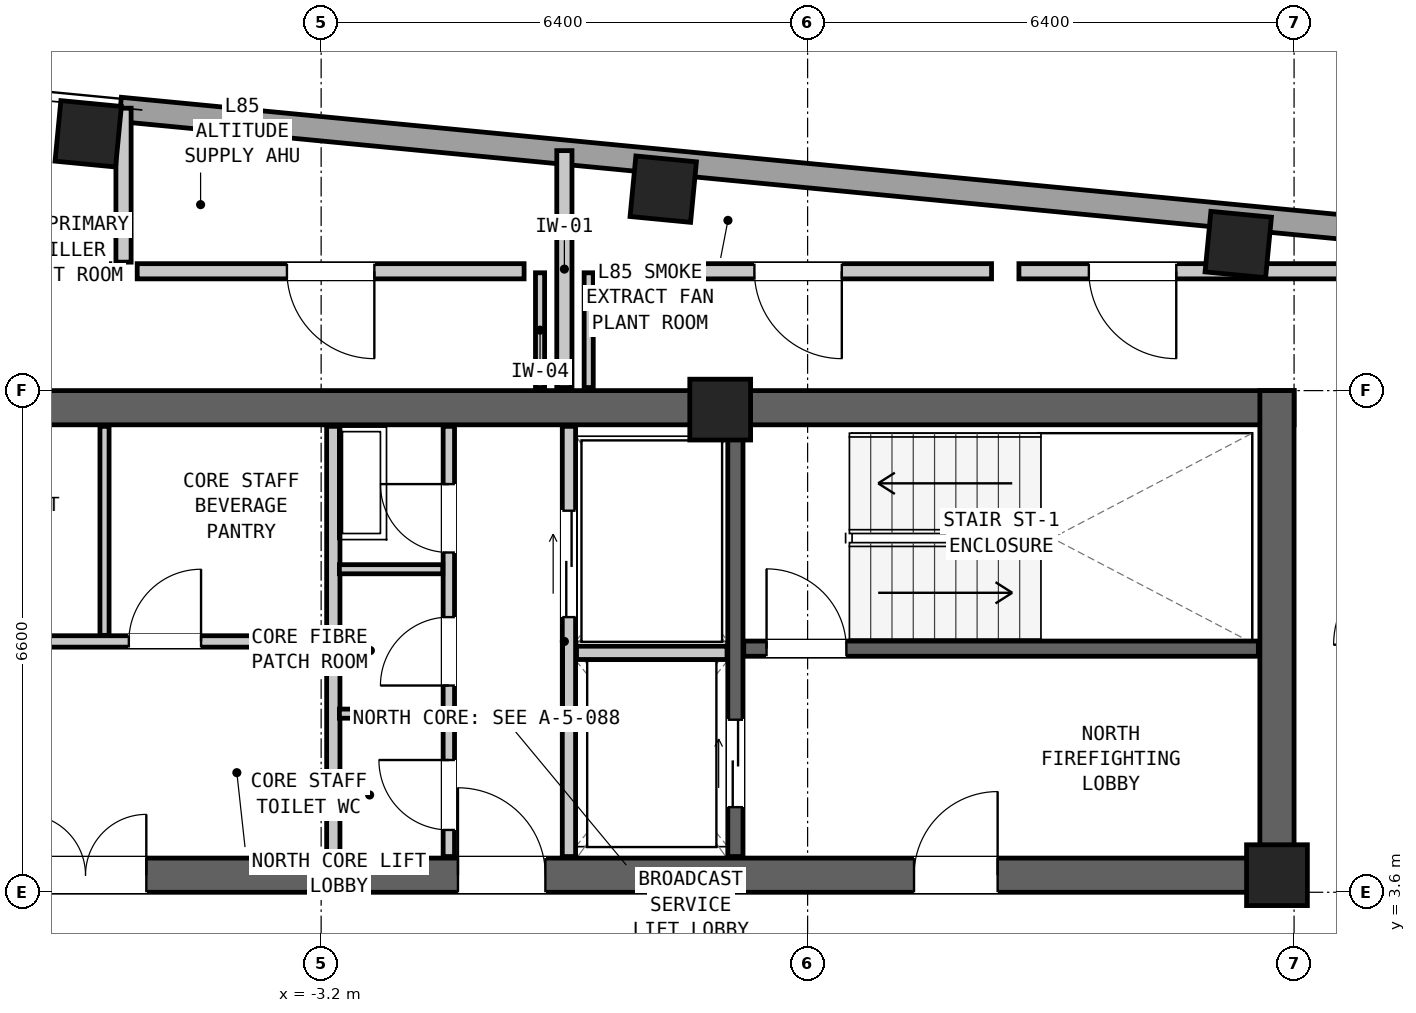
"""IFC4 building model, lengths in metres.
Left out: names, types, materials, properties, quantities, classifications, styles, units other than length and angle.
Written with IfcOpenShell. Run it as: python <this file> out.ifc"""

import sys

from ifc_helpers import new_model, si_unit, direction, frame, frame_2d, origin, origin_2d, place, context, subcontext, project, spatial, rectangle, extrude, element, fill, save


model = new_model("IFC4")
c1 = context("Model", 3, precision=1e-05, world=origin(), true_north=direction((0.0, 1.0)))
c2 = subcontext(c1, "Body", "Model", "MODEL_VIEW")
j1 = project(units=[si_unit("LENGTHUNIT", "METRE"), si_unit("PLANEANGLEUNIT", "RADIAN")], contexts=[c1])
p1 = place(None, origin())
s1 = spatial("IfcSite", under=j1, at=p1, CompositionType="ELEMENT")
p2 = place(p1, origin())
s2 = spatial("IfcBuilding", under=s1, at=p2, CompositionType="ELEMENT")
p3 = place(p2, frame((0.0, 0.0, 289.25)))
s3 = spatial("IfcBuildingStorey", under=s2, at=p3, CompositionType="ELEMENT", Elevation=289.25)
p4 = place(p3, frame((-9.6, 9.975, 0.0), z_axis=(0.0, 0.0, 1.0), x_axis=(1.0, 0.0, 0.0)))
e1 = element("IfcWall", 1, at=p4, inside=s3, PredefinedType="SHEAR", context=c2, shape_type="SweptSolid", body=[
    extrude(rectangle(XDim=19.2, YDim=0.45, at=frame_2d((9.6, 0.0))), origin(), (0.0, 0.0, 1.0), 3.6),
])
p5 = place(p3, frame((-9.6, 3.825, 0.0), z_axis=(0.0, 0.0, 1.0), x_axis=(1.0, 0.0, 0.0)))
e2 = element("IfcWall", 2, at=p5, inside=s3, PredefinedType="SHEAR", context=c2, shape_type="SweptSolid", body=[
    extrude(rectangle(XDim=19.2, YDim=0.45, at=frame_2d((9.6, 0.0))), origin(), (0.0, 0.0, 1.0), 3.6),
])
p6 = place(p5, frame((14.2, 0.0, 0.0)))
e3 = element("IfcOpeningElement", 3, at=p6, cuts=e2, PredefinedType="OPENING", context=c2, shape_type="SweptSolid", body=[
    extrude(rectangle(XDim=1.1, YDim=2.08, at=frame_2d((0.55, 1.04))), frame((0.0, 0.237, 0.0), z_axis=(0.0, -1.0, 0.0), x_axis=(1.0, 0.0, 0.0)), (0.0, 0.0, 1.0), 0.474),
])
p7 = place(p5, frame((8.2, 0.0, 0.0)))
e4 = element("IfcOpeningElement", 4, at=p7, cuts=e2, PredefinedType="OPENING", context=c2, shape_type="SweptSolid", body=[
    extrude(rectangle(XDim=1.15, YDim=2.1, at=frame_2d((0.575, 1.05))), frame((0.0, 0.237, 0.0), z_axis=(0.0, -1.0, 0.0), x_axis=(1.0, 0.0, 0.0)), (0.0, 0.0, 1.0), 0.474),
])
p8 = place(p5, frame((2.5, 0.0, 0.0)))
e5 = element("IfcOpeningElement", 5, at=p8, cuts=e2, PredefinedType="OPENING", context=c2, shape_type="SweptSolid", body=[
    extrude(rectangle(XDim=1.6, YDim=2.12, at=frame_2d((0.8, 1.06))), frame((0.0, 0.237, 0.0), z_axis=(0.0, -1.0, 0.0), x_axis=(1.0, 0.0, 0.0)), (0.0, 0.0, 1.0), 0.474),
])
p9 = place(p3, frame((9.375, 3.6, 0.0), z_axis=(0.0, 0.0, 1.0), x_axis=(0.0, 1.0, 0.0)))
e6 = element("IfcWall", 6, at=p9, inside=s3, PredefinedType="SHEAR", context=c2, shape_type="SweptSolid", body=[
    extrude(rectangle(XDim=6.6, YDim=0.45, at=frame_2d((3.3, 0.0))), origin(), (0.0, 0.0, 1.0), 3.6),
])
for number, where, z_axis, x_axis in (
    (7, (8.865, 12.122, 0.0), (0.0, 0.0, 1.0), (0.995, -0.096, 0.0)),
    (8, (1.301, 12.85, 0.0), (0.0, 0.0, 1.0), (0.995, -0.096, 0.0)),
    (9, (-6.264, 13.579, 0.0), (0.0, 0.0, 1.0), (0.995, -0.096, 0.0)),
    (10, (2.05, 9.95, 0.0), (0.0, 0.0, 1.0), (1.0, 0.0, 0.0)),
    (11, (9.375, 3.825, 0.0), (0.0, 0.0, 1.0), (1.0, 0.0, 0.0)),
):
    element("IfcColumn", number, at=place(p3, frame(where, z_axis=z_axis, x_axis=x_axis)), inside=s3, PredefinedType="COLUMN", context=c2, shape_type="SweptSolid", body=[
        extrude(rectangle(XDim=0.8, YDim=0.8, at=origin_2d()), origin(), (0.0, 0.0, 1.0), 3.6),
    ])
p10 = place(p3, frame((-5.844, 13.9, 0.0), z_axis=(0.0, 0.0, 1.0), x_axis=(0.995396489284, -0.095842731181, 0.0)))
e12 = element("IfcWall", 12, at=p10, inside=s3, PredefinedType="SOLIDWALL", context=c2, shape_type="SweptSolid", body=[
    extrude(rectangle(XDim=22.024, YDim=0.32, at=frame_2d((11.012, 0.0))), origin(), (0.0, 0.0, 1.0), 2.182),
])
p11 = place(p3, frame((2.36, 6.805, 0.0), z_axis=(0.0, 0.0, 1.0), x_axis=(1.0, 0.0, 0.0)))
e13 = element("IfcWall", 13, at=p11, inside=s3, PredefinedType="SHEAR", context=c2, shape_type="SweptSolid", body=[
    extrude(rectangle(XDim=6.77, YDim=0.2, at=frame_2d((3.385, 0.0))), origin(), (0.0, 0.0, 1.0), 3.32),
])
p12 = place(p11, frame((0.3, 0.0, 0.0)))
e14 = element("IfcOpeningElement", 14, at=p12, cuts=e13, PredefinedType="OPENING", context=c2, shape_type="SweptSolid", body=[
    extrude(rectangle(XDim=1.05, YDim=2.08, at=frame_2d((0.525, 1.04))), frame((0.0, 0.112, 0.0), z_axis=(0.0, -1.0, 0.0), x_axis=(1.0, 0.0, 0.0)), (0.0, 0.0, 1.0), 0.224),
])
p13 = place(p3, frame((2.25, 4.07, 0.0), z_axis=(0.0, 0.0, 1.0), x_axis=(0.0, 1.0, 0.0)))
e15 = element("IfcWall", 15, at=p13, inside=s3, PredefinedType="SHEAR", context=c2, shape_type="SweptSolid", body=[
    extrude(rectangle(XDim=5.66, YDim=0.2, at=frame_2d((2.83, 0.0))), origin(), (0.0, 0.0, 1.0), 3.32),
])
p14 = place(p13, frame((0.65, 0.0, 0.0)))
e16 = element("IfcOpeningElement", 16, at=p14, cuts=e15, PredefinedType="OPENING", context=c2, shape_type="SweptSolid", body=[
    extrude(rectangle(XDim=1.15, YDim=2.08, at=frame_2d((0.575, 1.04))), frame((0.0, 0.112, 0.0), z_axis=(0.0, -1.0, 0.0), x_axis=(1.0, 0.0, 0.0)), (0.0, 0.0, 1.0), 0.224),
])
p15 = place(p3, frame((0.06, 4.07, 0.0), z_axis=(0.0, 0.0, 1.0), x_axis=(0.0, 1.0, 0.0)))
e17 = element("IfcWall", 17, at=p15, inside=s3, PredefinedType="PARTITIONING", context=c2, shape_type="SweptSolid", body=[
    extrude(rectangle(XDim=5.66, YDim=0.175, at=frame_2d((2.83, 0.0))), origin(), (0.0, 0.0, 1.0), 3.32),
])
p16 = place(p15, frame((3.15, 0.0, 0.0)))
e18 = element("IfcOpeningElement", 18, at=p16, cuts=e17, PredefinedType="OPENING", context=c2, shape_type="SweptSolid", body=[
    extrude(rectangle(XDim=1.4, YDim=2.12, at=frame_2d((0.7, 1.06))), frame((0.0, 0.1, 0.0), z_axis=(0.0, -1.0, 0.0), x_axis=(1.0, 0.0, 0.0)), (0.0, 0.0, 1.0), 0.199),
])
p17 = place(p3, frame((0.16, 6.75, 0.0), z_axis=(0.0, 0.0, 1.0), x_axis=(1.0, 0.0, 0.0)))
e19 = element("IfcWall", 19, at=p17, inside=s3, PredefinedType="PARTITIONING", context=c2, shape_type="SweptSolid", body=[
    extrude(rectangle(XDim=1.98, YDim=0.175, at=frame_2d((0.99, 0.0))), origin(), (0.0, 0.0, 1.0), 3.32),
])
p18 = place(p3, frame((-3.04, 4.07, 0.0), z_axis=(0.0, 0.0, 1.0), x_axis=(0.0, 1.0, 0.0)))
e20 = element("IfcWall", 20, at=p18, inside=s3, PredefinedType="PARTITIONING", context=c2, shape_type="SweptSolid", body=[
    extrude(rectangle(XDim=5.66, YDim=0.175, at=frame_2d((2.83, 0.0))), origin(), (0.0, 0.0, 1.0), 3.32),
])
p19 = place(p3, frame((-1.52, 4.07, 0.0), z_axis=(0.0, 0.0, 1.0), x_axis=(0.0, 1.0, 0.0)))
e21 = element("IfcWall", 21, at=p19, inside=s3, PredefinedType="PARTITIONING", context=c2, shape_type="SweptSolid", body=[
    extrude(rectangle(XDim=5.66, YDim=0.15, at=frame_2d((2.83, 0.0))), origin(), (0.0, 0.0, 1.0), 3.32),
])
p20 = place(p19, frame((4.0, 0.0, 0.0)))
e22 = element("IfcOpeningElement", 22, at=p20, cuts=e21, PredefinedType="OPENING", context=c2, shape_type="SweptSolid", body=[
    extrude(rectangle(XDim=0.9, YDim=2.05, at=frame_2d((0.45, 1.025))), frame((0.0, 0.087, 0.0), z_axis=(0.0, -1.0, 0.0), x_axis=(1.0, 0.0, 0.0)), (0.0, 0.0, 1.0), 0.174),
])
p21 = place(p19, frame((2.25, 0.0, 0.0)))
e23 = element("IfcOpeningElement", 23, at=p21, cuts=e21, PredefinedType="OPENING", context=c2, shape_type="SweptSolid", body=[
    extrude(rectangle(XDim=0.9, YDim=2.05, at=frame_2d((0.45, 1.025))), frame((0.0, 0.087, 0.0), z_axis=(0.0, -1.0, 0.0), x_axis=(1.0, 0.0, 0.0)), (0.0, 0.0, 1.0), 0.174),
])
p22 = place(p19, frame((0.35, 0.0, 0.0)))
e24 = element("IfcOpeningElement", 24, at=p22, cuts=e21, PredefinedType="OPENING", context=c2, shape_type="SweptSolid", body=[
    extrude(rectangle(XDim=0.92, YDim=2.1, at=frame_2d((0.46, 1.05))), frame((0.0, 0.087, 0.0), z_axis=(0.0, -1.0, 0.0), x_axis=(1.0, 0.0, 0.0)), (0.0, 0.0, 1.0), 0.174),
])
for number, where, z_axis, x_axis in (
    (25, (-2.96, 5.95, 0.0), (0.0, 0.0, 1.0), (1.0, 0.0, 0.0)),
    (26, (-2.96, 7.85, 0.0), (0.0, 0.0, 1.0), (1.0, 0.0, 0.0)),
):
    element("IfcWall", number, at=place(p3, frame(where, z_axis=z_axis, x_axis=x_axis)), inside=s3, PredefinedType="PARTITIONING", context=c2, shape_type="SweptSolid", body=[
        extrude(rectangle(XDim=1.36, YDim=0.12, at=frame_2d((0.68, 0.0))), origin(), (0.0, 0.0, 1.0), 3.32),
    ])
p23 = place(p3, frame((-9.13, 6.9, 0.0), z_axis=(0.0, 0.0, 1.0), x_axis=(1.0, 0.0, 0.0)))
e27 = element("IfcWall", 27, at=p23, inside=s3, PredefinedType="PARTITIONING", context=c2, shape_type="SweptSolid", body=[
    extrude(rectangle(XDim=6.01, YDim=0.15, at=frame_2d((3.005, 0.0))), origin(), (0.0, 0.0, 1.0), 3.32),
])
p24 = place(p23, frame((0.6, 0.0, 0.0)))
e28 = element("IfcOpeningElement", 28, at=p24, cuts=e27, PredefinedType="OPENING", context=c2, shape_type="SweptSolid", body=[
    extrude(rectangle(XDim=0.95, YDim=2.1, at=frame_2d((0.475, 1.05))), frame((0.0, 0.087, 0.0), z_axis=(0.0, -1.0, 0.0), x_axis=(1.0, 0.0, 0.0)), (0.0, 0.0, 1.0), 0.174),
])
p25 = place(p23, frame((3.4, 0.0, 0.0)))
e29 = element("IfcOpeningElement", 29, at=p25, cuts=e27, PredefinedType="OPENING", context=c2, shape_type="SweptSolid", body=[
    extrude(rectangle(XDim=0.95, YDim=2.1, at=frame_2d((0.475, 1.05))), frame((0.0, 0.087, 0.0), z_axis=(0.0, -1.0, 0.0), x_axis=(1.0, 0.0, 0.0)), (0.0, 0.0, 1.0), 0.174),
])
p26 = place(p3, frame((-6.05, 6.98, 0.0), z_axis=(0.0, 0.0, 1.0), x_axis=(0.0, 1.0, 0.0)))
e30 = element("IfcWall", 30, at=p26, inside=s3, PredefinedType="PARTITIONING", context=c2, shape_type="SweptSolid", body=[
    extrude(rectangle(XDim=2.75, YDim=0.12, at=frame_2d((1.375, 0.0))), origin(), (0.0, 0.0, 1.0), 3.32),
])
p27 = place(p3, frame((0.0, 10.24, 0.0), z_axis=(0.0, 0.0, 1.0), x_axis=(0.0, 1.0, 0.0)))
e31 = element("IfcWall", 31, at=p27, inside=s3, PredefinedType="PARTITIONING", context=c2, shape_type="SweptSolid", body=[
    extrude(rectangle(XDim=3.117, YDim=0.2, at=frame_2d((1.559, 0.0))), origin(), (0.0, 0.0, 1.0), 2.538),
])
for number, where, z_axis, x_axis in (
    (32, (-0.32, 10.24, 0.0), (0.0, 0.0, 1.0), (0.0, 1.0, 0.0)),
    (33, (0.32, 10.24, 0.0), (0.0, 0.0, 1.0), (0.0, 1.0, 0.0)),
):
    element("IfcWall", number, at=place(p3, frame(where, z_axis=z_axis, x_axis=x_axis)), inside=s3, PredefinedType="PARTITIONING", context=c2, shape_type="SweptSolid", body=[
        extrude(rectangle(XDim=1.51, YDim=0.12, at=frame_2d((0.755, 0.0))), origin(), (0.0, 0.0, 1.0), 2.538),
    ])
p28 = place(p3, frame((-5.98, 11.77, 0.0), z_axis=(0.0, 0.0, 1.0), x_axis=(-1.0, 0.0, 0.0)))
e34 = element("IfcWall", 34, at=p28, inside=s3, PredefinedType="PARTITIONING", context=c2, shape_type="SweptSolid", body=[
    extrude(rectangle(XDim=4.99, YDim=0.2, at=frame_2d((2.495, 0.0))), origin(), (0.0, 0.0, 1.0), 3.32),
])
p29 = place(p28, frame((1.89, 0.0, 0.0)))
e35 = element("IfcOpeningElement", 35, at=p29, cuts=e34, PredefinedType="OPENING", context=c2, shape_type="SweptSolid", body=[
    extrude(rectangle(XDim=1.15, YDim=2.1, at=frame_2d((0.575, 1.05))), frame((0.0, 0.112, 0.0), z_axis=(0.0, -1.0, 0.0), x_axis=(1.0, 0.0, 0.0)), (0.0, 0.0, 1.0), 0.224),
])
p30 = place(p3, frame((-5.8, 11.89, 0.0), z_axis=(0.0, 0.0, 1.0), x_axis=(0.0, 1.0, 0.0)))
e36 = element("IfcWall", 36, at=p30, inside=s3, PredefinedType="PARTITIONING", context=c2, shape_type="SweptSolid", body=[
    extrude(rectangle(XDim=2.026, YDim=0.2, at=frame_2d((1.013, 0.0))), origin(), (0.0, 0.0, 1.0), 2.538),
])
p31 = place(p3, frame((-0.53, 11.77, 0.0), z_axis=(0.0, 0.0, 1.0), x_axis=(-1.0, 0.0, 0.0)))
e37 = element("IfcWall", 37, at=p31, inside=s3, PredefinedType="PARTITIONING", context=c2, shape_type="SweptSolid", body=[
    extrude(rectangle(XDim=5.09, YDim=0.2, at=frame_2d((2.545, 0.0))), origin(), (0.0, 0.0, 1.0), 3.32),
])
p32 = place(p31, frame((1.97, 0.0, 0.0)))
e38 = element("IfcOpeningElement", 38, at=p32, cuts=e37, PredefinedType="OPENING", context=c2, shape_type="SweptSolid", body=[
    extrude(rectangle(XDim=1.15, YDim=2.1, at=frame_2d((0.575, 1.05))), frame((0.0, 0.112, 0.0), z_axis=(0.0, -1.0, 0.0), x_axis=(1.0, 0.0, 0.0)), (0.0, 0.0, 1.0), 0.224),
])
p33 = place(p3, frame((5.62, 11.77, 0.0), z_axis=(0.0, 0.0, 1.0), x_axis=(-1.0, 0.0, 0.0)))
e39 = element("IfcWall", 39, at=p33, inside=s3, PredefinedType="PARTITIONING", context=c2, shape_type="SweptSolid", body=[
    extrude(rectangle(XDim=5.09, YDim=0.2, at=frame_2d((2.545, 0.0))), origin(), (0.0, 0.0, 1.0), 3.32),
])
p34 = place(p33, frame((1.97, 0.0, 0.0)))
e40 = element("IfcOpeningElement", 40, at=p34, cuts=e39, PredefinedType="OPENING", context=c2, shape_type="SweptSolid", body=[
    extrude(rectangle(XDim=1.15, YDim=2.1, at=frame_2d((0.575, 1.05))), frame((0.0, 0.112, 0.0), z_axis=(0.0, -1.0, 0.0), x_axis=(1.0, 0.0, 0.0)), (0.0, 0.0, 1.0), 0.224),
])
p35 = place(p3, frame((10.97, 11.77, 0.0), z_axis=(0.0, 0.0, 1.0), x_axis=(-1.0, 0.0, 0.0)))
e41 = element("IfcWall", 41, at=p35, inside=s3, PredefinedType="PARTITIONING", context=c2, shape_type="SweptSolid", body=[
    extrude(rectangle(XDim=4.99, YDim=0.2, at=frame_2d((2.495, 0.0))), origin(), (0.0, 0.0, 1.0), 2.182),
])
p36 = place(p35, frame((2.92, 0.0, 0.0)))
e42 = element("IfcOpeningElement", 42, at=p36, cuts=e41, PredefinedType="OPENING", context=c2, shape_type="SweptSolid", body=[
    extrude(rectangle(XDim=1.15, YDim=2.1, at=frame_2d((0.575, 1.05))), frame((0.0, 0.112, 0.0), z_axis=(0.0, -1.0, 0.0), x_axis=(1.0, 0.0, 0.0)), (0.0, 0.0, 1.0), 0.224),
])
p37 = place(p12, origin())
e43 = element("IfcDoor", 43, at=p37, inside=s3, OperationType="SINGLE_SWING_LEFT", PredefinedType="DOOR", context=c2, shape_type="SweptSolid", body=[
    extrude(rectangle(XDim=1.05, YDim=2.08, at=frame_2d((0.525, 1.04))), frame((0.0, 0.025, 0.0), z_axis=(0.0, -1.0, 0.0), x_axis=(1.0, 0.0, 0.0)), (0.0, 0.0, 1.0), 0.05),
])
fill(e14, e43)
p38 = place(p6, origin())
e44 = element("IfcDoor", 44, at=p38, inside=s3, OperationType="SINGLE_SWING_RIGHT", PredefinedType="DOOR", context=c2, shape_type="SweptSolid", body=[
    extrude(rectangle(XDim=1.1, YDim=2.08, at=frame_2d((0.55, 1.04))), frame((0.0, 0.025, 0.0), z_axis=(0.0, -1.0, 0.0), x_axis=(1.0, 0.0, 0.0)), (0.0, 0.0, 1.0), 0.05),
])
fill(e3, e44)
p39 = place(p14, origin())
e45 = element("IfcDoor", 45, at=p39, inside=s3, OperationType="DOUBLE_DOOR_SLIDING", PredefinedType="DOOR", context=c2, shape_type="SweptSolid", body=[
    extrude(rectangle(XDim=1.15, YDim=2.08, at=frame_2d((0.575, 1.04))), frame((0.0, 0.025, 0.0), z_axis=(0.0, -1.0, 0.0), x_axis=(1.0, 0.0, 0.0)), (0.0, 0.0, 1.0), 0.05),
])
fill(e16, e45)
p40 = place(p16, origin())
e46 = element("IfcDoor", 46, at=p40, inside=s3, OperationType="DOUBLE_DOOR_SLIDING", PredefinedType="DOOR", context=c2, shape_type="SweptSolid", body=[
    extrude(rectangle(XDim=1.4, YDim=2.12, at=frame_2d((0.7, 1.06))), frame((0.0, 0.025, 0.0), z_axis=(0.0, -1.0, 0.0), x_axis=(1.0, 0.0, 0.0)), (0.0, 0.0, 1.0), 0.05),
])
fill(e18, e46)
p41 = place(p7, origin())
e47 = element("IfcDoor", 47, at=p41, inside=s3, OperationType="SINGLE_SWING_LEFT", PredefinedType="DOOR", context=c2, shape_type="SweptSolid", body=[
    extrude(rectangle(XDim=1.15, YDim=2.1, at=frame_2d((0.575, 1.05))), frame((0.0, 0.025, 0.0), z_axis=(0.0, -1.0, 0.0), x_axis=(1.0, 0.0, 0.0)), (0.0, 0.0, 1.0), 0.05),
])
fill(e4, e47)
p42 = place(p20, origin())
e48 = element("IfcDoor", 48, at=p42, inside=s3, OperationType="SINGLE_SWING_RIGHT", PredefinedType="DOOR", context=c2, shape_type="SweptSolid", body=[
    extrude(rectangle(XDim=0.9, YDim=2.05, at=frame_2d((0.45, 1.025))), frame((0.0, 0.025, 0.0), z_axis=(0.0, -1.0, 0.0), x_axis=(1.0, 0.0, 0.0)), (0.0, 0.0, 1.0), 0.05),
])
fill(e22, e48)
p43 = place(p21, origin())
e49 = element("IfcDoor", 49, at=p43, inside=s3, OperationType="SINGLE_SWING_LEFT", PredefinedType="DOOR", context=c2, shape_type="SweptSolid", body=[
    extrude(rectangle(XDim=0.9, YDim=2.05, at=frame_2d((0.45, 1.025))), frame((0.0, 0.025, 0.0), z_axis=(0.0, -1.0, 0.0), x_axis=(1.0, 0.0, 0.0)), (0.0, 0.0, 1.0), 0.05),
])
fill(e23, e49)
p44 = place(p22, origin())
e50 = element("IfcDoor", 50, at=p44, inside=s3, OperationType="SINGLE_SWING_RIGHT", PredefinedType="DOOR", context=c2, shape_type="SweptSolid", body=[
    extrude(rectangle(XDim=0.92, YDim=2.1, at=frame_2d((0.46, 1.05))), frame((0.0, 0.025, 0.0), z_axis=(0.0, -1.0, 0.0), x_axis=(1.0, 0.0, 0.0)), (0.0, 0.0, 1.0), 0.05),
])
fill(e24, e50)
p45 = place(p8, origin())
e51 = element("IfcDoor", 51, at=p45, inside=s3, OperationType="DOUBLE_DOOR_SINGLE_SWING", PredefinedType="DOOR", context=c2, shape_type="SweptSolid", body=[
    extrude(rectangle(XDim=1.6, YDim=2.12, at=frame_2d((0.8, 1.06))), frame((0.0, 0.025, 0.0), z_axis=(0.0, -1.0, 0.0), x_axis=(1.0, 0.0, 0.0)), (0.0, 0.0, 1.0), 0.05),
])
fill(e5, e51)
p46 = place(p25, origin())
e52 = element("IfcDoor", 52, at=p46, inside=s3, OperationType="SINGLE_SWING_RIGHT", PredefinedType="DOOR", context=c2, shape_type="SweptSolid", body=[
    extrude(rectangle(XDim=0.95, YDim=2.1, at=frame_2d((0.475, 1.05))), frame((0.0, 0.025, 0.0), z_axis=(0.0, -1.0, 0.0), x_axis=(1.0, 0.0, 0.0)), (0.0, 0.0, 1.0), 0.05),
])
fill(e29, e52)
p47 = place(p32, origin())
e53 = element("IfcDoor", 53, at=p47, inside=s3, OperationType="SINGLE_SWING_LEFT", PredefinedType="DOOR", context=c2, shape_type="SweptSolid", body=[
    extrude(rectangle(XDim=1.15, YDim=2.1, at=frame_2d((0.575, 1.05))), frame((0.0, 0.025, 0.0), z_axis=(0.0, -1.0, 0.0), x_axis=(1.0, 0.0, 0.0)), (0.0, 0.0, 1.0), 0.05),
])
fill(e38, e53)
p48 = place(p34, origin())
e54 = element("IfcDoor", 54, at=p48, inside=s3, OperationType="SINGLE_SWING_LEFT", PredefinedType="DOOR", context=c2, shape_type="SweptSolid", body=[
    extrude(rectangle(XDim=1.15, YDim=2.1, at=frame_2d((0.575, 1.05))), frame((0.0, 0.025, 0.0), z_axis=(0.0, -1.0, 0.0), x_axis=(1.0, 0.0, 0.0)), (0.0, 0.0, 1.0), 0.05),
])
fill(e40, e54)
p49 = place(p36, origin())
e55 = element("IfcDoor", 55, at=p49, inside=s3, OperationType="SINGLE_SWING_LEFT", PredefinedType="DOOR", context=c2, shape_type="SweptSolid", body=[
    extrude(rectangle(XDim=1.15, YDim=2.1, at=frame_2d((0.575, 1.05))), frame((0.0, 0.025, 0.0), z_axis=(0.0, -1.0, 0.0), x_axis=(1.0, 0.0, 0.0)), (0.0, 0.0, 1.0), 0.05),
])
fill(e42, e55)
save(model, sys.argv[1])
